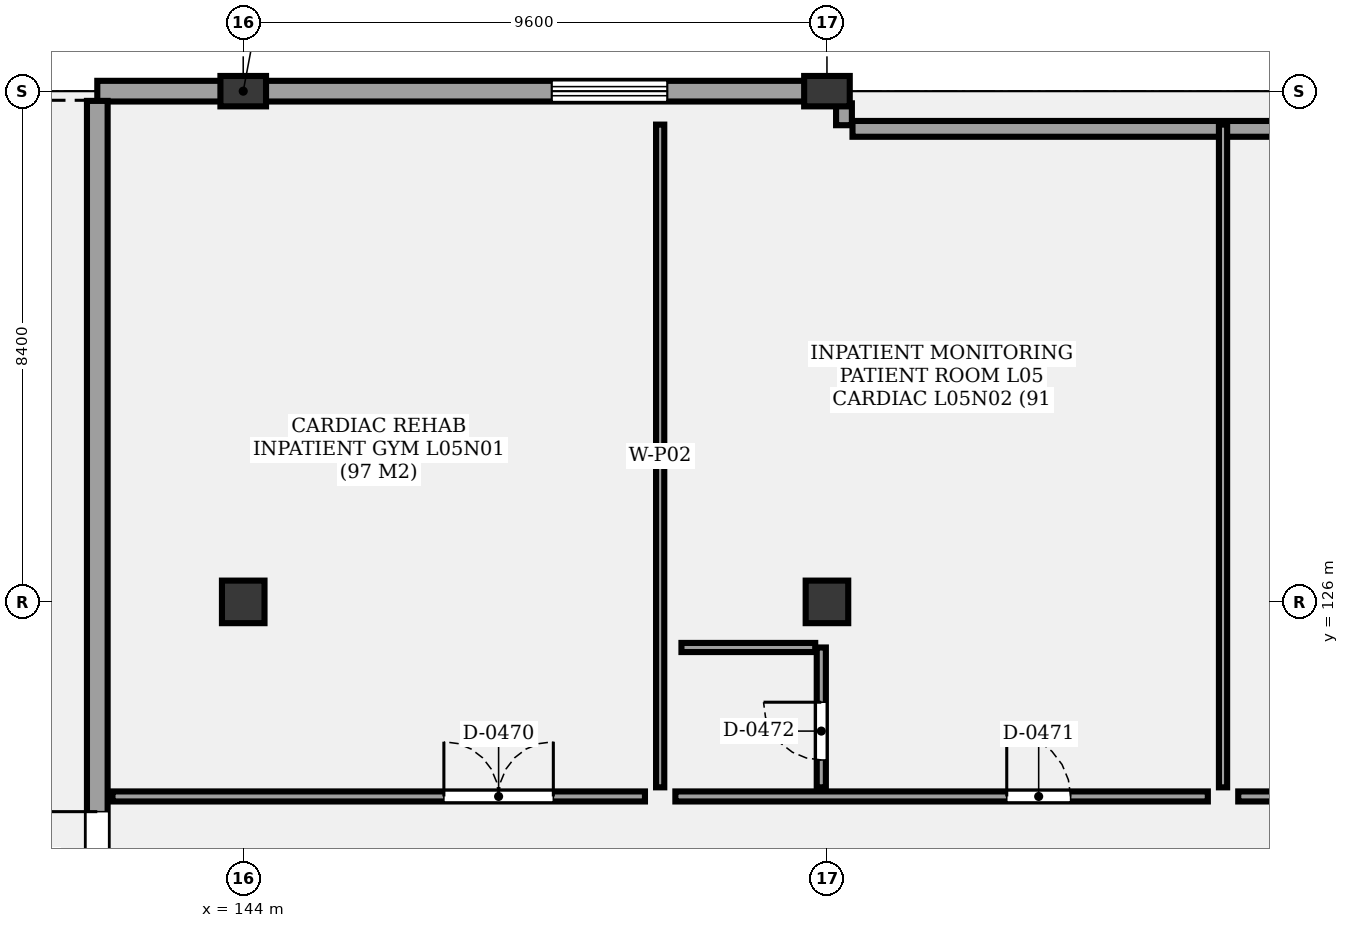
"""IFC4 building model, lengths in metres.
Left out: names, types, materials, properties, quantities, classifications, styles, units other than length and angle.
Written with IfcOpenShell. Run it as: python <this file> out.ifc"""

import sys

from ifc_helpers import new_model, si_unit, direction, frame, frame_2d, origin, origin_2d, place, context, subcontext, project, spatial, rectangle, extrude, element, fill, save


model = new_model("IFC4")
c1 = context("Model", 3, precision=1e-05, world=origin(), true_north=direction((0.0, 1.0)))
c2 = subcontext(c1, "Body", "Model", "MODEL_VIEW")
j1 = project(units=[si_unit("LENGTHUNIT", "METRE"), si_unit("PLANEANGLEUNIT", "RADIAN")], contexts=[c1])
p1 = place(None, origin())
s1 = spatial("IfcSite", under=j1, at=p1, CompositionType="ELEMENT")
p2 = place(p1, origin())
s2 = spatial("IfcBuilding", under=s1, at=p2, CompositionType="ELEMENT")
p3 = place(p2, frame((0.0, 0.0, 22.0)))
s3 = spatial("IfcBuildingStorey", under=s2, at=p3, CompositionType="ELEMENT", Elevation=22.0)
p4 = place(p3, frame((144.0, 126.0, 0.0), z_axis=(0.0, 0.0, 1.0), x_axis=(1.0, 0.0, 0.0)))
e1 = element("IfcColumn", 1, at=p4, inside=s3, PredefinedType="COLUMN", context=c2, shape_type="SweptSolid", body=[
    extrude(rectangle(XDim=0.7, YDim=0.7, at=origin_2d()), origin(), (0.0, 0.0, 1.0), 4.2),
])
p5 = place(p3, frame((144.0, 134.4, 0.0), z_axis=(0.0, 0.0, 1.0), x_axis=(1.0, 0.0, 0.0)))
e2 = element("IfcColumn", 2, at=p5, inside=s3, PredefinedType="COLUMN", context=c2, shape_type="SweptSolid", body=[
    extrude(rectangle(XDim=0.75, YDim=0.5, at=origin_2d()), origin(), (0.0, 0.0, 1.0), 4.2),
])
p6 = place(p3, frame((153.6, 126.0, 0.0), z_axis=(0.0, 0.0, 1.0), x_axis=(1.0, 0.0, 0.0)))
e3 = element("IfcColumn", 3, at=p6, inside=s3, PredefinedType="COLUMN", context=c2, shape_type="SweptSolid", body=[
    extrude(rectangle(XDim=0.7, YDim=0.7, at=origin_2d()), origin(), (0.0, 0.0, 1.0), 4.2),
])
p7 = place(p3, frame((153.6, 134.4, 0.0), z_axis=(0.0, 0.0, 1.0), x_axis=(1.0, 0.0, 0.0)))
e4 = element("IfcColumn", 4, at=p7, inside=s3, PredefinedType="COLUMN", context=c2, shape_type="SweptSolid", body=[
    extrude(rectangle(XDim=0.75, YDim=0.5, at=origin_2d()), origin(), (0.0, 0.0, 1.0), 4.2),
])
p8 = place(p3, frame((141.6, 134.4, 0.0), z_axis=(0.0, 0.0, 1.0), x_axis=(1.0, 0.0, 0.0)))
e5 = element("IfcWall", 5, at=p8, inside=s3, PredefinedType="SOLIDWALL", context=c2, shape_type="SweptSolid", body=[
    extrude(rectangle(XDim=12.0, YDim=0.34, at=frame_2d((6.0, 0.0))), origin(), (0.0, 0.0, 1.0), 3.39),
])
p9 = place(p8, frame((7.474, 0.0, 0.85)))
e6 = element("IfcOpeningElement", 6, at=p9, cuts=e5, PredefinedType="OPENING", context=c2, shape_type="SweptSolid", body=[
    extrude(rectangle(XDim=1.9, YDim=1.4, at=frame_2d((0.95, 0.7))), frame((0.0, 0.18, 0.0), z_axis=(0.0, -1.0, 0.0), x_axis=(1.0, 0.0, 0.0)), (0.0, 0.0, 1.0), 0.36),
])
p10 = place(p3, frame((153.88, 134.2, 0.0), z_axis=(0.0, 0.0, 1.0), x_axis=(0.0, -1.0, 0.0)))
e7 = element("IfcWall", 7, at=p10, inside=s3, PredefinedType="SOLIDWALL", context=c2, shape_type="SweptSolid", body=[
    extrude(rectangle(XDim=0.36, YDim=0.26, at=frame_2d((0.18, 0.0))), origin(), (0.0, 0.0, 1.0), 3.39),
])
p11 = place(p3, frame((154.02, 133.78, 0.0), z_axis=(0.0, 0.0, 1.0), x_axis=(1.0, 0.0, 0.0)))
e8 = element("IfcWall", 8, at=p11, inside=s3, PredefinedType="SOLIDWALL", context=c2, shape_type="SweptSolid", body=[
    extrude(rectangle(XDim=18.36, YDim=0.26, at=frame_2d((9.18, 0.0))), origin(), (0.0, 0.0, 1.0), 3.39),
])
p12 = place(p3, frame((141.6, 100.96, 0.0), z_axis=(0.0, 0.0, 1.0), x_axis=(0.0, 1.0, 0.0)))
e9 = element("IfcWall", 9, at=p12, inside=s3, PredefinedType="SOLIDWALL", context=c2, shape_type="SweptSolid", body=[
    extrude(rectangle(XDim=33.28, YDim=0.34, at=frame_2d((16.64, 0.0))), origin(), (0.0, 0.0, 1.0), 3.39),
])
p13 = place(p12, frame((19.99, 0.0, 0.0)))
e10 = element("IfcOpeningElement", 10, at=p13, cuts=e9, PredefinedType="OPENING", context=c2, shape_type="SweptSolid", body=[
    extrude(rectangle(XDim=1.6, YDim=2.3, at=frame_2d((0.8, 1.15))), frame((0.0, 0.18, 0.0), z_axis=(0.0, -1.0, 0.0), x_axis=(1.0, 0.0, 0.0)), (0.0, 0.0, 1.0), 0.36),
])
p14 = place(p3, frame((141.85, 122.8, 0.0), z_axis=(0.0, 0.0, 1.0), x_axis=(1.0, 0.0, 0.0)))
e11 = element("IfcWall", 11, at=p14, inside=s3, PredefinedType="PARTITIONING", context=c2, shape_type="SweptSolid", body=[
    extrude(rectangle(XDim=8.757, YDim=0.165, at=frame_2d((4.378, 0.0))), origin(), (0.0, 0.0, 1.0), 3.3),
])
p15 = place(p14, frame((5.45, 0.0, 0.0)))
e12 = element("IfcOpeningElement", 12, at=p15, cuts=e11, PredefinedType="OPENING", context=c2, shape_type="SweptSolid", body=[
    extrude(rectangle(XDim=1.8, YDim=2.2, at=frame_2d((0.9, 1.1))), frame((0.0, 0.093, 0.0), z_axis=(0.0, -1.0, 0.0), x_axis=(1.0, 0.0, 0.0)), (0.0, 0.0, 1.0), 0.185),
])
p16 = place(p3, frame((151.107, 122.8, 0.0), z_axis=(0.0, 0.0, 1.0), x_axis=(1.0, 0.0, 0.0)))
e13 = element("IfcWall", 13, at=p16, inside=s3, PredefinedType="PARTITIONING", context=c2, shape_type="SweptSolid", body=[
    extrude(rectangle(XDim=8.757, YDim=0.165, at=frame_2d((4.378, 0.0))), origin(), (0.0, 0.0, 1.0), 3.3),
])
p17 = place(p16, frame((5.45, 0.0, 0.0)))
e14 = element("IfcOpeningElement", 14, at=p17, cuts=e13, PredefinedType="OPENING", context=c2, shape_type="SweptSolid", body=[
    extrude(rectangle(XDim=1.05, YDim=2.2, at=frame_2d((0.525, 1.1))), frame((0.0, 0.093, 0.0), z_axis=(0.0, -1.0, 0.0), x_axis=(1.0, 0.0, 0.0)), (0.0, 0.0, 1.0), 0.185),
])
p18 = place(p3, frame((153.507, 122.95, 0.0), z_axis=(0.0, 0.0, 1.0), x_axis=(0.0, 1.0, 0.0)))
e15 = element("IfcWall", 15, at=p18, inside=s3, PredefinedType="PARTITIONING", context=c2, shape_type="SweptSolid", body=[
    extrude(rectangle(XDim=2.3, YDim=0.15, at=frame_2d((1.15, 0.0))), origin(), (0.0, 0.0, 1.0), 3.3),
])
p19 = place(p18, frame((0.45, 0.0, 0.0)))
e16 = element("IfcOpeningElement", 16, at=p19, cuts=e15, PredefinedType="OPENING", context=c2, shape_type="SweptSolid", body=[
    extrude(rectangle(XDim=0.95, YDim=2.1, at=frame_2d((0.475, 1.05))), frame((0.0, 0.085, 0.0), z_axis=(0.0, -1.0, 0.0), x_axis=(1.0, 0.0, 0.0)), (0.0, 0.0, 1.0), 0.17),
])
p20 = place(p3, frame((151.207, 125.25, 0.0), z_axis=(0.0, 0.0, 1.0), x_axis=(1.0, 0.0, 0.0)))
e17 = element("IfcWall", 17, at=p20, inside=s3, PredefinedType="PARTITIONING", context=c2, shape_type="SweptSolid", body=[
    extrude(rectangle(XDim=2.2, YDim=0.15, at=frame_2d((1.1, 0.0))), origin(), (0.0, 0.0, 1.0), 3.3),
])
p21 = place(p3, frame((150.857, 122.95, 0.0), z_axis=(0.0, 0.0, 1.0), x_axis=(0.0, 1.0, 0.0)))
e18 = element("IfcWall", 18, at=p21, inside=s3, PredefinedType="PARTITIONING", context=c2, shape_type="SweptSolid", body=[
    extrude(rectangle(XDim=10.9, YDim=0.135, at=frame_2d((5.45, 0.0))), origin(), (0.0, 0.0, 1.0), 3.3),
])
p22 = place(p3, frame((160.364, 122.8, 0.0), z_axis=(0.0, 0.0, 1.0), x_axis=(1.0, 0.0, 0.0)))
e19 = element("IfcWall", 19, at=p22, inside=s3, PredefinedType="PARTITIONING", context=c2, shape_type="SweptSolid", body=[
    extrude(rectangle(XDim=8.757, YDim=0.165, at=frame_2d((4.378, 0.0))), origin(), (0.0, 0.0, 1.0), 3.3),
])
p23 = place(p22, frame((5.45, 0.0, 0.0)))
e20 = element("IfcOpeningElement", 20, at=p23, cuts=e19, PredefinedType="OPENING", context=c2, shape_type="SweptSolid", body=[
    extrude(rectangle(XDim=0.9, YDim=2.1, at=frame_2d((0.45, 1.05))), frame((0.0, 0.093, 0.0), z_axis=(0.0, -1.0, 0.0), x_axis=(1.0, 0.0, 0.0)), (0.0, 0.0, 1.0), 0.185),
])
p24 = place(p3, frame((160.114, 122.95, 0.0), z_axis=(0.0, 0.0, 1.0), x_axis=(0.0, 1.0, 0.0)))
e21 = element("IfcWall", 21, at=p24, inside=s3, PredefinedType="PARTITIONING", context=c2, shape_type="SweptSolid", body=[
    extrude(rectangle(XDim=10.9, YDim=0.135, at=frame_2d((5.45, 0.0))), origin(), (0.0, 0.0, 1.0), 3.3),
])
p25 = place(p9, origin())
e22 = element("IfcWindow", 22, at=p25, inside=s3, PartitioningType="SINGLE_PANEL", PredefinedType="WINDOW", context=c2, shape_type="SweptSolid", body=[
    extrude(rectangle(XDim=1.9, YDim=1.4, at=frame_2d((0.95, 0.7))), frame((0.0, 0.03, 0.0), z_axis=(0.0, -1.0, 0.0), x_axis=(1.0, 0.0, 0.0)), (0.0, 0.0, 1.0), 0.06),
])
fill(e6, e22)
p26 = place(p13, origin())
e23 = element("IfcDoor", 23, at=p26, inside=s3, OperationType="SINGLE_SWING_RIGHT", PredefinedType="DOOR", context=c2, shape_type="SweptSolid", body=[
    extrude(rectangle(XDim=1.6, YDim=2.3, at=frame_2d((0.8, 1.15))), frame((0.0, 0.025, 0.0), z_axis=(0.0, -1.0, 0.0), x_axis=(1.0, 0.0, 0.0)), (0.0, 0.0, 1.0), 0.05),
])
fill(e10, e23)
p27 = place(p15, origin())
e24 = element("IfcDoor", 24, at=p27, inside=s3, OperationType="DOUBLE_DOOR_SINGLE_SWING", PredefinedType="DOOR", context=c2, shape_type="SweptSolid", body=[
    extrude(rectangle(XDim=1.8, YDim=2.2, at=frame_2d((0.9, 1.1))), frame((0.0, 0.025, 0.0), z_axis=(0.0, -1.0, 0.0), x_axis=(1.0, 0.0, 0.0)), (0.0, 0.0, 1.0), 0.05),
])
fill(e12, e24)
p28 = place(p17, origin())
e25 = element("IfcDoor", 25, at=p28, inside=s3, OperationType="SINGLE_SWING_LEFT", PredefinedType="DOOR", context=c2, shape_type="SweptSolid", body=[
    extrude(rectangle(XDim=1.05, YDim=2.2, at=frame_2d((0.525, 1.1))), frame((0.0, 0.025, 0.0), z_axis=(0.0, -1.0, 0.0), x_axis=(1.0, 0.0, 0.0)), (0.0, 0.0, 1.0), 0.05),
])
fill(e14, e25)
p29 = place(p19, origin())
e26 = element("IfcDoor", 26, at=p29, inside=s3, OperationType="SINGLE_SWING_RIGHT", PredefinedType="DOOR", context=c2, shape_type="SweptSolid", body=[
    extrude(rectangle(XDim=0.95, YDim=2.1, at=frame_2d((0.475, 1.05))), frame((0.0, 0.025, 0.0), z_axis=(0.0, -1.0, 0.0), x_axis=(1.0, 0.0, 0.0)), (0.0, 0.0, 1.0), 0.05),
])
fill(e16, e26)
save(model, sys.argv[1])
